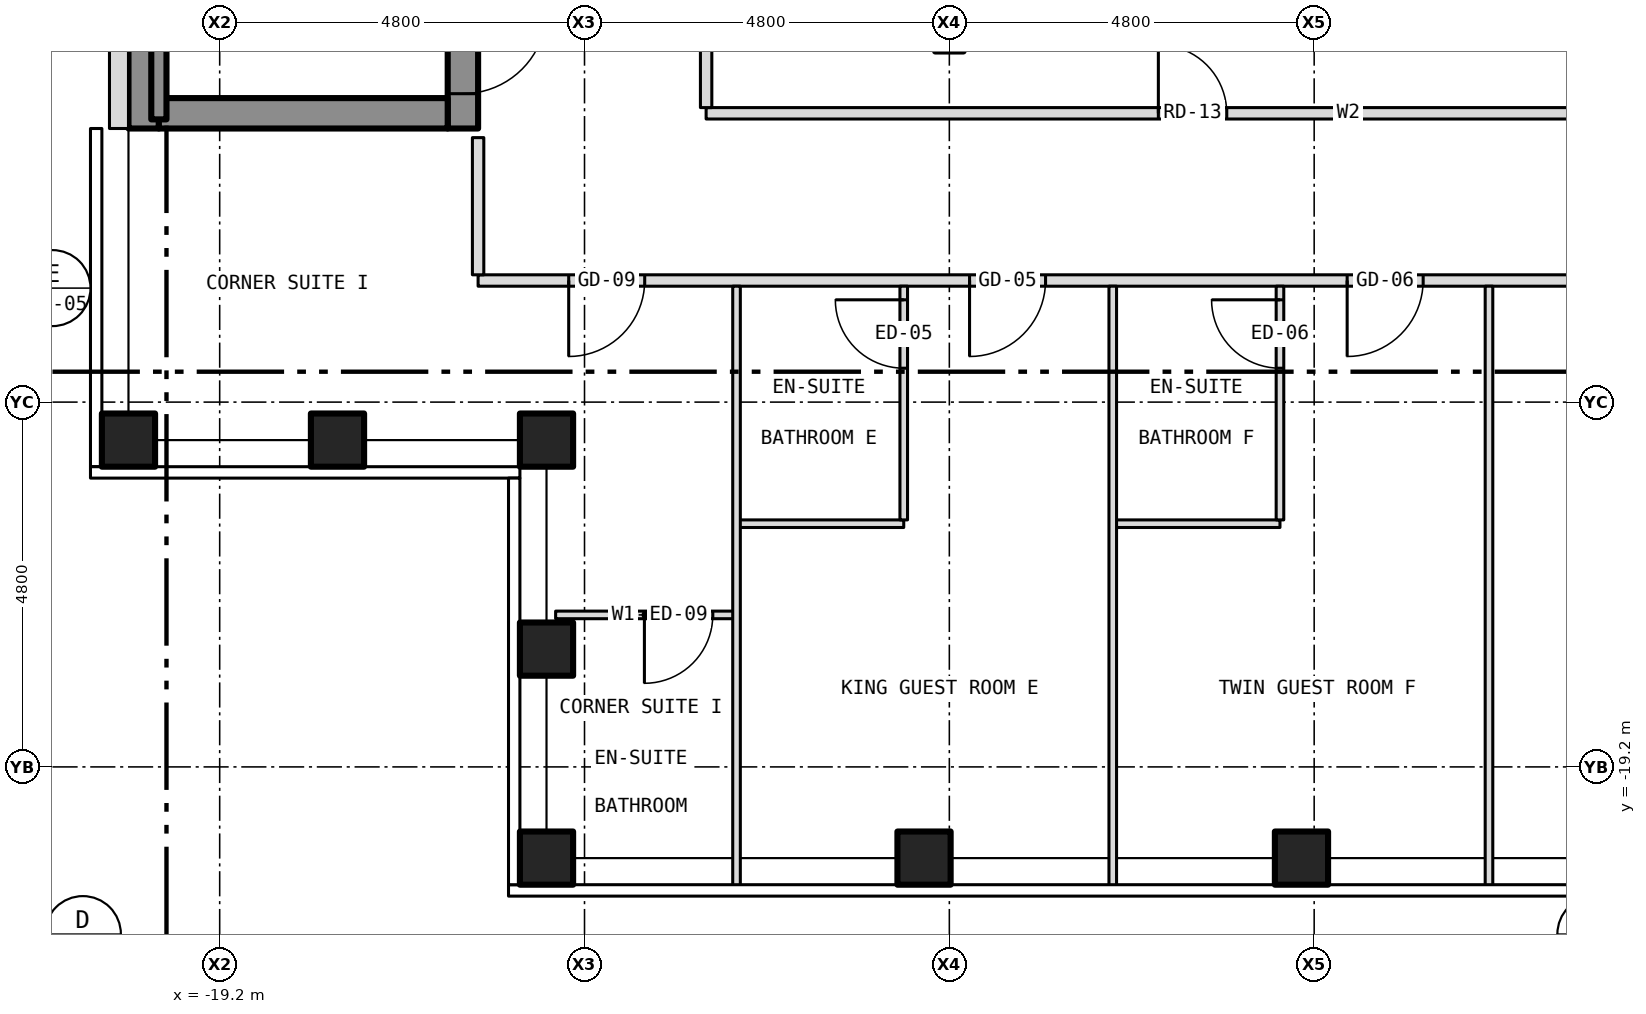
"""IFC4 building model, lengths in metres.
Left out: names, types, materials, properties, quantities, classifications, styles, units other than length and angle.
Written with IfcOpenShell. Run it as: python <this file> out.ifc"""

import sys

from ifc_helpers import new_model, si_unit, direction, frame, frame_2d, origin, origin_2d, place, context, subcontext, project, spatial, rectangle, hollow_rectangle, extrude, element, fill, save


model = new_model("IFC4")
c1 = context("Model", 3, precision=1e-05, world=origin(), true_north=direction((0.0, 1.0)))
c2 = subcontext(c1, "Body", "Model", "MODEL_VIEW")
j1 = project(units=[si_unit("LENGTHUNIT", "METRE"), si_unit("PLANEANGLEUNIT", "RADIAN")], contexts=[c1])
p1 = place(None, origin())
s1 = spatial("IfcSite", under=j1, at=p1, CompositionType="ELEMENT")
p2 = place(p1, origin())
s2 = spatial("IfcBuilding", under=s1, at=p2, CompositionType="ELEMENT")
p3 = place(p2, frame((0.0, 0.0, 205.0)))
s3 = spatial("IfcBuildingStorey", under=s2, at=p3, CompositionType="ELEMENT", Elevation=205.0)
for number, where, z_axis, x_axis in (
    (1, (-14.9, -20.4, -0.15), (0.0, 0.0, 1.0), (1.0, 0.0, 0.0)),
    (2, (-9.933, -20.4, -0.15), (0.0, 0.0, 1.0), (1.0, 0.0, 0.0)),
    (3, (-4.967, -20.4, -0.15), (0.0, 0.0, 1.0), (1.0, 0.0, 0.0)),
    (4, (-20.4, -14.9, -0.15), (0.0, 0.0, 1.0), (1.0, 0.0, 0.0)),
    (5, (-14.9, -14.9, -0.15), (0.0, 0.0, 1.0), (1.0, 0.0, 0.0)),
    (6, (-14.9, -17.65, -0.15), (0.0, 0.0, 1.0), (1.0, 0.0, 0.0)),
    (7, (-17.65, -14.9, -0.15), (0.0, 0.0, 1.0), (1.0, 0.0, 0.0)),
):
    element("IfcColumn", number, at=place(p3, frame(where, z_axis=z_axis, x_axis=x_axis)), inside=s3, PredefinedType="COLUMN", context=c2, shape_type="SweptSolid", body=[
        extrude(hollow_rectangle(XDim=0.7, YDim=0.7, WallThickness=0.04, at=origin_2d()), origin(), (0.0, 0.0, 1.0), 3.5),
    ])
p4 = place(p3, frame((-16.0, -10.8, 0.0), z_axis=(0.0, 0.0, 1.0), x_axis=(0.0, 1.0, 0.0)))
e8 = element("IfcWall", 8, at=p4, inside=s3, PredefinedType="SHEAR", context=c2, shape_type="SweptSolid", body=[
    extrude(rectangle(XDim=21.6, YDim=0.4, at=frame_2d((10.8, 0.0))), origin(), (0.0, 0.0, 1.0), 3.25),
])
p5 = place(p4, frame((9.4, 0.0, 0.0)))
e9 = element("IfcOpeningElement", 9, at=p5, cuts=e8, PredefinedType="OPENING", context=c2, shape_type="SweptSolid", body=[
    extrude(rectangle(XDim=1.1, YDim=2.1, at=frame_2d((0.55, 1.05))), frame((0.0, 0.212, 0.0), z_axis=(0.0, -1.0, 0.0), x_axis=(1.0, 0.0, 0.0)), (0.0, 0.0, 1.0), 0.424),
])
p6 = place(p4, frame((11.5, 0.0, 0.0)))
e10 = element("IfcOpeningElement", 10, at=p6, cuts=e8, PredefinedType="OPENING", context=c2, shape_type="SweptSolid", body=[
    extrude(rectangle(XDim=1.1, YDim=2.1, at=frame_2d((0.55, 1.05))), frame((0.0, 0.212, 0.0), z_axis=(0.0, -1.0, 0.0), x_axis=(1.0, 0.0, 0.0)), (0.0, 0.0, 1.0), 0.424),
])
p7 = place(p4, frame((13.6, 0.0, 0.0)))
e11 = element("IfcOpeningElement", 11, at=p7, cuts=e8, PredefinedType="OPENING", context=c2, shape_type="SweptSolid", body=[
    extrude(rectangle(XDim=1.1, YDim=2.1, at=frame_2d((0.55, 1.05))), frame((0.0, 0.212, 0.0), z_axis=(0.0, -1.0, 0.0), x_axis=(1.0, 0.0, 0.0)), (0.0, 0.0, 1.0), 0.424),
])
p8 = place(p4, frame((15.7, 0.0, 0.0)))
e12 = element("IfcOpeningElement", 12, at=p8, cuts=e8, PredefinedType="OPENING", context=c2, shape_type="SweptSolid", body=[
    extrude(rectangle(XDim=1.1, YDim=2.1, at=frame_2d((0.55, 1.05))), frame((0.0, 0.212, 0.0), z_axis=(0.0, -1.0, 0.0), x_axis=(1.0, 0.0, 0.0)), (0.0, 0.0, 1.0), 0.424),
])
p9 = place(p4, frame((17.8, 0.0, 0.0)))
e13 = element("IfcOpeningElement", 13, at=p9, cuts=e8, PredefinedType="OPENING", context=c2, shape_type="SweptSolid", body=[
    extrude(rectangle(XDim=1.1, YDim=2.1, at=frame_2d((0.55, 1.05))), frame((0.0, 0.212, 0.0), z_axis=(0.0, -1.0, 0.0), x_axis=(1.0, 0.0, 0.0)), (0.0, 0.0, 1.0), 0.424),
])
p10 = place(p4, frame((0.458, 0.0, 0.0)))
e14 = element("IfcOpeningElement", 14, at=p10, cuts=e8, PredefinedType="OPENING", context=c2, shape_type="SweptSolid", body=[
    extrude(rectangle(XDim=1.1, YDim=2.1, at=frame_2d((0.55, 1.05))), frame((0.0, 0.212, 0.0), z_axis=(0.0, -1.0, 0.0), x_axis=(1.0, 0.0, 0.0)), (0.0, 0.0, 1.0), 0.424),
])
p11 = place(p4, frame((7.5, 0.0, 0.0)))
e15 = element("IfcOpeningElement", 15, at=p11, cuts=e8, PredefinedType="OPENING", context=c2, shape_type="SweptSolid", body=[
    extrude(rectangle(XDim=1.1, YDim=2.1, at=frame_2d((0.55, 1.05))), frame((0.0, 0.212, 0.0), z_axis=(0.0, -1.0, 0.0), x_axis=(1.0, 0.0, 0.0)), (0.0, 0.0, 1.0), 0.424),
])
p12 = place(p4, frame((20.0, 0.0, 0.0)))
e16 = element("IfcOpeningElement", 16, at=p12, cuts=e8, PredefinedType="OPENING", context=c2, shape_type="SweptSolid", body=[
    extrude(rectangle(XDim=0.9, YDim=2.1, at=frame_2d((0.45, 1.05))), frame((0.0, 0.212, 0.0), z_axis=(0.0, -1.0, 0.0), x_axis=(1.0, 0.0, 0.0)), (0.0, 0.0, 1.0), 0.424),
])
p13 = place(p3, frame((-20.2, -10.8, 0.0), z_axis=(0.0, 0.0, 1.0), x_axis=(0.0, 1.0, 0.0)))
e17 = element("IfcWall", 17, at=p13, inside=s3, PredefinedType="SHEAR", context=c2, shape_type="SweptSolid", body=[
    extrude(rectangle(XDim=21.6, YDim=0.4, at=frame_2d((10.8, 0.0))), origin(), (0.0, 0.0, 1.0), 3.25),
])
p14 = place(p3, frame((-20.0, -10.6, 0.0), z_axis=(0.0, 0.0, 1.0), x_axis=(1.0, 0.0, 0.0)))
e18 = element("IfcWall", 18, at=p14, inside=s3, PredefinedType="SHEAR", context=c2, shape_type="SweptSolid", body=[
    extrude(rectangle(XDim=3.8, YDim=0.4, at=frame_2d((1.9, 0.0))), origin(), (0.0, 0.0, 1.0), 3.25),
])
p15 = place(p3, frame((-20.525, 10.8, 0.0), z_axis=(0.0, 0.0, 1.0), x_axis=(0.0, -1.0, 0.0)))
e19 = element("IfcWall", 19, at=p15, inside=s3, PredefinedType="SOLIDWALL", context=c2, shape_type="SweptSolid", body=[
    extrude(rectangle(XDim=21.6, YDim=0.25, at=frame_2d((10.8, 0.0))), origin(), (0.0, 0.0, 1.0), 3.5),
])
p16 = place(p15, frame((18.05, 0.0, 1.0)))
e20 = element("IfcOpeningElement", 20, at=p16, cuts=e19, PredefinedType="OPENING", context=c2, shape_type="SweptSolid", body=[
    extrude(rectangle(XDim=0.6, YDim=1.5, at=frame_2d((0.3, 0.75))), frame((0.0, 0.137, 0.0), z_axis=(0.0, -1.0, 0.0), x_axis=(1.0, 0.0, 0.0)), (0.0, 0.0, 1.0), 0.274),
])
p17 = place(p3, frame((-14.78, -17.2, 0.0), z_axis=(0.0, 0.0, 1.0), x_axis=(1.0, 0.0, 0.0)))
e21 = element("IfcWall", 21, at=p17, inside=s3, PredefinedType="PARTITIONING", context=c2, shape_type="SweptSolid", body=[
    extrude(rectangle(XDim=2.38, YDim=0.1, at=frame_2d((1.19, 0.0))), origin(), (0.0, 0.0, 1.0), 3.35),
])
p18 = place(p17, frame((1.168, 0.0, 0.0)))
e22 = element("IfcOpeningElement", 22, at=p18, cuts=e21, PredefinedType="OPENING", context=c2, shape_type="SweptSolid", body=[
    extrude(rectangle(XDim=0.9, YDim=2.1, at=frame_2d((0.45, 1.05))), frame((0.0, 0.062, 0.0), z_axis=(0.0, -1.0, 0.0), x_axis=(1.0, 0.0, 0.0)), (0.0, 0.0, 1.0), 0.124),
])
for number, where, z_axis, x_axis in (
    (23, (-12.4, -16.0, 0.0), (0.0, 0.0, 1.0), (1.0, 0.0, 0.0)),
    (24, (-7.45, -16.0, 0.0), (0.0, 0.0, 1.0), (1.0, 0.0, 0.0)),
):
    element("IfcWall", number, at=place(p3, frame(where, z_axis=z_axis, x_axis=x_axis)), inside=s3, PredefinedType="PARTITIONING", context=c2, shape_type="SweptSolid", body=[
        extrude(rectangle(XDim=2.2, YDim=0.1, at=frame_2d((1.1, 0.0))), origin(), (0.0, 0.0, 1.0), 3.35),
    ])
p19 = place(p3, frame((-15.8, -12.8, 0.0), z_axis=(0.0, 0.0, 1.0), x_axis=(1.0, 0.0, 0.0)))
e25 = element("IfcWall", 25, at=p19, inside=s3, PredefinedType="PARTITIONING", context=c2, shape_type="SweptSolid", body=[
    extrude(rectangle(XDim=31.6, YDim=0.15, at=frame_2d((15.8, 0.0))), origin(), (0.0, 0.0, 1.0), 3.35),
])
p20 = place(p19, frame((6.466, 0.0, 0.0)))
e26 = element("IfcOpeningElement", 26, at=p20, cuts=e25, PredefinedType="OPENING", context=c2, shape_type="SweptSolid", body=[
    extrude(rectangle(XDim=1.0, YDim=2.1, at=frame_2d((0.5, 1.05))), frame((0.0, 0.087, 0.0), z_axis=(0.0, -1.0, 0.0), x_axis=(1.0, 0.0, 0.0)), (0.0, 0.0, 1.0), 0.174),
])
p21 = place(p19, frame((11.434, 0.0, 0.0)))
e27 = element("IfcOpeningElement", 27, at=p21, cuts=e25, PredefinedType="OPENING", context=c2, shape_type="SweptSolid", body=[
    extrude(rectangle(XDim=1.0, YDim=2.1, at=frame_2d((0.5, 1.05))), frame((0.0, 0.087, 0.0), z_axis=(0.0, -1.0, 0.0), x_axis=(1.0, 0.0, 0.0)), (0.0, 0.0, 1.0), 0.174),
])
p22 = place(p19, frame((15.442, 0.0, 0.0)))
e28 = element("IfcOpeningElement", 28, at=p22, cuts=e25, PredefinedType="OPENING", context=c2, shape_type="SweptSolid", body=[
    extrude(rectangle(XDim=1.0, YDim=2.1, at=frame_2d((0.5, 1.05))), frame((0.0, 0.087, 0.0), z_axis=(0.0, -1.0, 0.0), x_axis=(1.0, 0.0, 0.0)), (0.0, 0.0, 1.0), 0.174),
])
p23 = place(p19, frame((25.092, 0.0, 0.0)))
e29 = element("IfcOpeningElement", 29, at=p23, cuts=e25, PredefinedType="OPENING", context=c2, shape_type="SweptSolid", body=[
    extrude(rectangle(XDim=1.0, YDim=2.1, at=frame_2d((0.5, 1.05))), frame((0.0, 0.087, 0.0), z_axis=(0.0, -1.0, 0.0), x_axis=(1.0, 0.0, 0.0)), (0.0, 0.0, 1.0), 0.174),
])
p24 = place(p19, frame((1.192, 0.0, 0.0)))
e30 = element("IfcOpeningElement", 30, at=p24, cuts=e25, PredefinedType="OPENING", context=c2, shape_type="SweptSolid", body=[
    extrude(rectangle(XDim=1.0, YDim=2.1, at=frame_2d((0.5, 1.05))), frame((0.0, 0.087, 0.0), z_axis=(0.0, -1.0, 0.0), x_axis=(1.0, 0.0, 0.0)), (0.0, 0.0, 1.0), 0.174),
])
p25 = place(p19, frame((29.409, 0.0, 0.0)))
e31 = element("IfcOpeningElement", 31, at=p25, cuts=e25, PredefinedType="OPENING", context=c2, shape_type="SweptSolid", body=[
    extrude(rectangle(XDim=1.0, YDim=2.1, at=frame_2d((0.5, 1.05))), frame((0.0, 0.087, 0.0), z_axis=(0.0, -1.0, 0.0), x_axis=(1.0, 0.0, 0.0)), (0.0, 0.0, 1.0), 0.174),
])
p26 = place(p3, frame((-12.8, -10.6, 0.0), z_axis=(0.0, 0.0, 1.0), x_axis=(1.0, 0.0, 0.0)))
e32 = element("IfcWall", 32, at=p26, inside=s3, PredefinedType="PARTITIONING", context=c2, shape_type="SweptSolid", body=[
    extrude(rectangle(XDim=16.9, YDim=0.15, at=frame_2d((8.45, 0.0))), origin(), (0.0, 0.0, 1.0), 3.35),
])
p27 = place(p26, frame((5.95, 0.0, 0.0)))
e33 = element("IfcOpeningElement", 33, at=p27, cuts=e32, PredefinedType="OPENING", context=c2, shape_type="SweptSolid", body=[
    extrude(rectangle(XDim=0.9, YDim=2.1, at=frame_2d((0.45, 1.05))), frame((0.0, 0.087, 0.0), z_axis=(0.0, -1.0, 0.0), x_axis=(1.0, 0.0, 0.0)), (0.0, 0.0, 1.0), 0.174),
])
p28 = place(p3, frame((-20.0, -10.68, 0.0), z_axis=(0.0, 0.0, 1.0), x_axis=(0.0, 1.0, 0.0)))
e34 = element("IfcWall", 34, at=p28, inside=s3, PredefinedType="SHEAR", context=c2, shape_type="SweptSolid", body=[
    extrude(rectangle(XDim=6.98, YDim=0.2, at=frame_2d((3.49, 0.0))), origin(), (0.0, 0.0, 1.0), 3.25),
])
p29 = place(p3, frame((-15.8, -12.725, 0.0), z_axis=(0.0, 0.0, 1.0), x_axis=(0.0, 1.0, 0.0)))
e35 = element("IfcWall", 35, at=p29, inside=s3, PredefinedType="PARTITIONING", context=c2, shape_type="SweptSolid", body=[
    extrude(rectangle(XDim=1.805, YDim=0.15, at=frame_2d((0.903, 0.0))), origin(), (0.0, 0.0, 1.0), 3.35),
])
p30 = place(p3, frame((-12.8, -10.525, 0.0), z_axis=(0.0, 0.0, 1.0), x_axis=(0.0, 1.0, 0.0)))
e36 = element("IfcWall", 36, at=p30, inside=s3, PredefinedType="PARTITIONING", context=c2, shape_type="SweptSolid", body=[
    extrude(rectangle(XDim=8.525, YDim=0.15, at=frame_2d((4.262, 0.0))), origin(), (0.0, 0.0, 1.0), 3.35),
])
p31 = place(p3, frame((-12.4, -20.78, 0.0), z_axis=(0.0, 0.0, 1.0), x_axis=(0.0, 1.0, 0.0)))
e37 = element("IfcWall", 37, at=p31, inside=s3, PredefinedType="PARTITIONING", context=c2, shape_type="SweptSolid", body=[
    extrude(rectangle(XDim=7.905, YDim=0.1, at=frame_2d((3.953, 0.0))), origin(), (0.0, 0.0, 1.0), 3.35),
])
p32 = place(p3, frame((-10.2, -15.95, 0.0), z_axis=(0.0, 0.0, 1.0), x_axis=(0.0, 1.0, 0.0)))
e38 = element("IfcWall", 38, at=p32, inside=s3, PredefinedType="PARTITIONING", context=c2, shape_type="SweptSolid", body=[
    extrude(rectangle(XDim=3.075, YDim=0.1, at=frame_2d((1.538, 0.0))), origin(), (0.0, 0.0, 1.0), 3.35),
])
p33 = place(p32, frame((1.996, 0.0, 0.0)))
e39 = element("IfcOpeningElement", 39, at=p33, cuts=e38, PredefinedType="OPENING", context=c2, shape_type="SweptSolid", body=[
    extrude(rectangle(XDim=0.9, YDim=2.1, at=frame_2d((0.45, 1.05))), frame((0.0, 0.062, 0.0), z_axis=(0.0, -1.0, 0.0), x_axis=(1.0, 0.0, 0.0)), (0.0, 0.0, 1.0), 0.124),
])
p34 = place(p3, frame((-7.45, -20.78, 0.0), z_axis=(0.0, 0.0, 1.0), x_axis=(0.0, 1.0, 0.0)))
e40 = element("IfcWall", 40, at=p34, inside=s3, PredefinedType="PARTITIONING", context=c2, shape_type="SweptSolid", body=[
    extrude(rectangle(XDim=7.905, YDim=0.1, at=frame_2d((3.953, 0.0))), origin(), (0.0, 0.0, 1.0), 3.35),
])
p35 = place(p3, frame((-5.25, -15.95, 0.0), z_axis=(0.0, 0.0, 1.0), x_axis=(0.0, 1.0, 0.0)))
e41 = element("IfcWall", 41, at=p35, inside=s3, PredefinedType="PARTITIONING", context=c2, shape_type="SweptSolid", body=[
    extrude(rectangle(XDim=3.075, YDim=0.1, at=frame_2d((1.538, 0.0))), origin(), (0.0, 0.0, 1.0), 3.35),
])
p36 = place(p35, frame((1.996, 0.0, 0.0)))
e42 = element("IfcOpeningElement", 42, at=p36, cuts=e41, PredefinedType="OPENING", context=c2, shape_type="SweptSolid", body=[
    extrude(rectangle(XDim=0.9, YDim=2.1, at=frame_2d((0.45, 1.05))), frame((0.0, 0.062, 0.0), z_axis=(0.0, -1.0, 0.0), x_axis=(1.0, 0.0, 0.0)), (0.0, 0.0, 1.0), 0.124),
])
p37 = place(p3, frame((-2.5, -20.78, 0.0), z_axis=(0.0, 0.0, 1.0), x_axis=(0.0, 1.0, 0.0)))
e43 = element("IfcWall", 43, at=p37, inside=s3, PredefinedType="PARTITIONING", context=c2, shape_type="SweptSolid", body=[
    extrude(rectangle(XDim=7.905, YDim=0.1, at=frame_2d((3.953, 0.0))), origin(), (0.0, 0.0, 1.0), 3.35),
])
p38 = place(p10, origin())
e44 = element("IfcDoor", 44, at=p38, inside=s3, OperationType="SINGLE_SWING_RIGHT", PredefinedType="DOOR", context=c2, shape_type="SweptSolid", body=[
    extrude(rectangle(XDim=1.1, YDim=2.1, at=frame_2d((0.55, 1.05))), frame((0.0, 0.025, 0.0), z_axis=(0.0, -1.0, 0.0), x_axis=(1.0, 0.0, 0.0)), (0.0, 0.0, 1.0), 0.05),
])
fill(e14, e44)
p39 = place(p20, origin())
e45 = element("IfcDoor", 45, at=p39, inside=s3, OperationType="SINGLE_SWING_LEFT", PredefinedType="DOOR", context=c2, shape_type="SweptSolid", body=[
    extrude(rectangle(XDim=1.0, YDim=2.1, at=frame_2d((0.5, 1.05))), frame((0.0, 0.025, 0.0), z_axis=(0.0, -1.0, 0.0), x_axis=(1.0, 0.0, 0.0)), (0.0, 0.0, 1.0), 0.05),
])
fill(e26, e45)
p40 = place(p33, origin())
e46 = element("IfcDoor", 46, at=p40, inside=s3, OperationType="SINGLE_SWING_RIGHT", PredefinedType="DOOR", context=c2, shape_type="SweptSolid", body=[
    extrude(rectangle(XDim=0.9, YDim=2.1, at=frame_2d((0.45, 1.05))), frame((0.0, 0.025, 0.0), z_axis=(0.0, -1.0, 0.0), x_axis=(1.0, 0.0, 0.0)), (0.0, 0.0, 1.0), 0.05),
])
fill(e39, e46)
p41 = place(p21, origin())
e47 = element("IfcDoor", 47, at=p41, inside=s3, OperationType="SINGLE_SWING_LEFT", PredefinedType="DOOR", context=c2, shape_type="SweptSolid", body=[
    extrude(rectangle(XDim=1.0, YDim=2.1, at=frame_2d((0.5, 1.05))), frame((0.0, 0.025, 0.0), z_axis=(0.0, -1.0, 0.0), x_axis=(1.0, 0.0, 0.0)), (0.0, 0.0, 1.0), 0.05),
])
fill(e27, e47)
p42 = place(p36, origin())
e48 = element("IfcDoor", 48, at=p42, inside=s3, OperationType="SINGLE_SWING_RIGHT", PredefinedType="DOOR", context=c2, shape_type="SweptSolid", body=[
    extrude(rectangle(XDim=0.9, YDim=2.1, at=frame_2d((0.45, 1.05))), frame((0.0, 0.025, 0.0), z_axis=(0.0, -1.0, 0.0), x_axis=(1.0, 0.0, 0.0)), (0.0, 0.0, 1.0), 0.05),
])
fill(e42, e48)
p43 = place(p18, origin())
e49 = element("IfcDoor", 49, at=p43, inside=s3, OperationType="SINGLE_SWING_LEFT", PredefinedType="DOOR", context=c2, shape_type="SweptSolid", body=[
    extrude(rectangle(XDim=0.9, YDim=2.1, at=frame_2d((0.45, 1.05))), frame((0.0, 0.025, 0.0), z_axis=(0.0, -1.0, 0.0), x_axis=(1.0, 0.0, 0.0)), (0.0, 0.0, 1.0), 0.05),
])
fill(e22, e49)
p44 = place(p24, origin())
e50 = element("IfcDoor", 50, at=p44, inside=s3, OperationType="SINGLE_SWING_LEFT", PredefinedType="DOOR", context=c2, shape_type="SweptSolid", body=[
    extrude(rectangle(XDim=1.0, YDim=2.1, at=frame_2d((0.5, 1.05))), frame((0.0, 0.025, 0.0), z_axis=(0.0, -1.0, 0.0), x_axis=(1.0, 0.0, 0.0)), (0.0, 0.0, 1.0), 0.05),
])
fill(e30, e50)
p45 = place(p27, origin())
e51 = element("IfcDoor", 51, at=p45, inside=s3, OperationType="SINGLE_SWING_LEFT", PredefinedType="DOOR", context=c2, shape_type="SweptSolid", body=[
    extrude(rectangle(XDim=0.9, YDim=2.1, at=frame_2d((0.45, 1.05))), frame((0.0, 0.025, 0.0), z_axis=(0.0, -1.0, 0.0), x_axis=(1.0, 0.0, 0.0)), (0.0, 0.0, 1.0), 0.05),
])
fill(e33, e51)
save(model, sys.argv[1])
